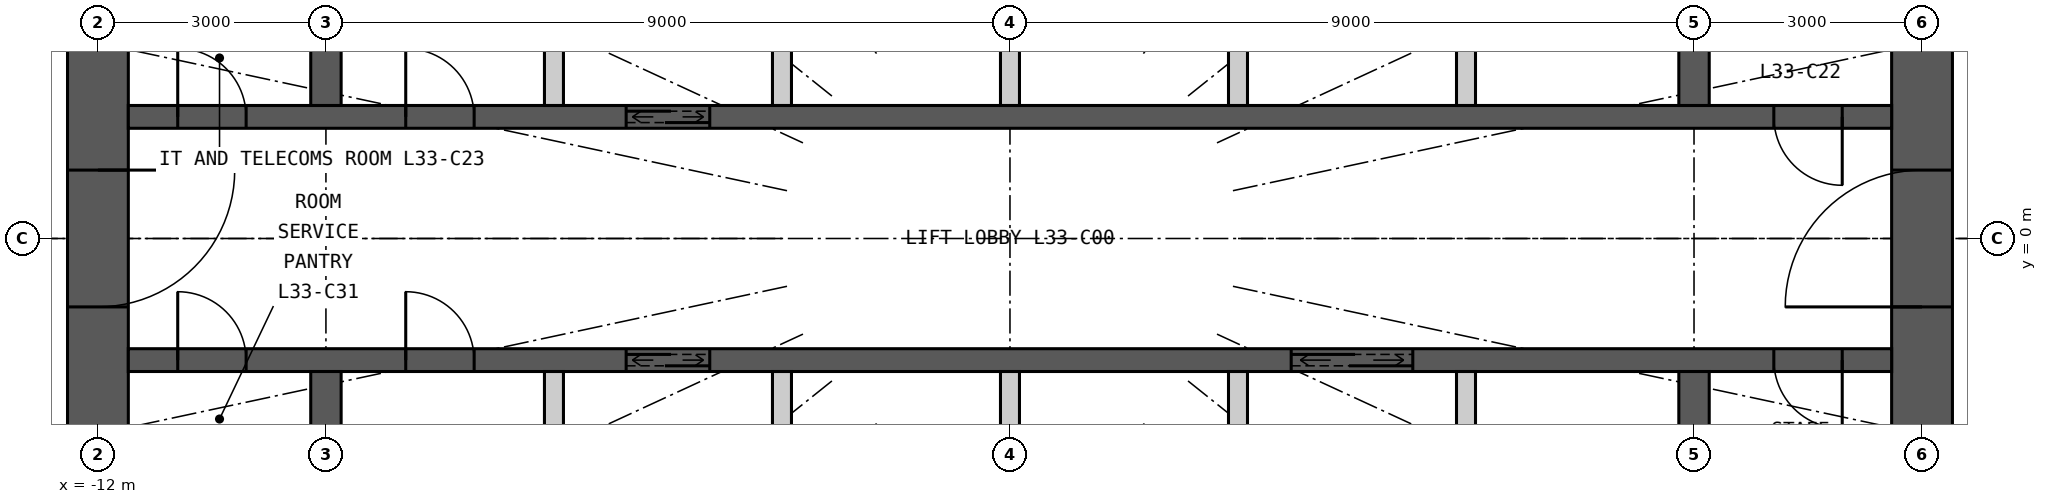
"""IFC4 building model, lengths in metres.
Left out: names, types, materials, properties, quantities, classifications, styles, units other than length and angle.
Written with IfcOpenShell. Run it as: python <this file> out.ifc"""

import sys

from ifc_helpers import new_model, si_unit, direction, frame, frame_2d, origin, place, context, subcontext, project, spatial, rectangle, extrude, element, fill, save


model = new_model("IFC4")
c1 = context("Model", 3, precision=1e-05, world=origin(), true_north=direction((0.0, 1.0)))
c2 = subcontext(c1, "Body", "Model", "MODEL_VIEW")
j1 = project(units=[si_unit("LENGTHUNIT", "METRE"), si_unit("PLANEANGLEUNIT", "RADIAN")], contexts=[c1])
p1 = place(None, origin())
s1 = spatial("IfcSite", under=j1, at=p1, CompositionType="ELEMENT")
p2 = place(p1, origin())
s2 = spatial("IfcBuilding", under=s1, at=p2, CompositionType="ELEMENT")
p3 = place(p2, frame((0.0, 0.0, 128.7)))
s3 = spatial("IfcBuildingStorey", under=s2, at=p3, CompositionType="ELEMENT", Elevation=128.7)
p4 = place(p3, frame((12.0, -7.6, 0.0), z_axis=(0.0, 0.0, 1.0), x_axis=(0.0, 1.0, 0.0)))
e1 = element("IfcWall", 1, at=p4, inside=s3, PredefinedType="SHEAR", context=c2, shape_type="SweptSolid", body=[
    extrude(rectangle(XDim=15.2, YDim=0.8, at=frame_2d((7.6, 0.0))), origin(), (0.0, 0.0, 1.0), 3.3),
])
p5 = place(p4, frame((6.7, 0.0, 0.0)))
e2 = element("IfcOpeningElement", 2, at=p5, cuts=e1, PredefinedType="OPENING", context=c2, shape_type="SweptSolid", body=[
    extrude(rectangle(XDim=1.8, YDim=2.2, at=frame_2d((0.9, 1.1))), frame((0.0, 0.41, 0.0), z_axis=(0.0, -1.0, 0.0), x_axis=(1.0, 0.0, 0.0)), (0.0, 0.0, 1.0), 0.82),
])
p6 = place(p3, frame((-12.0, 7.6, 0.0), z_axis=(0.0, 0.0, 1.0), x_axis=(0.0, -1.0, 0.0)))
e3 = element("IfcWall", 3, at=p6, inside=s3, PredefinedType="SHEAR", context=c2, shape_type="SweptSolid", body=[
    extrude(rectangle(XDim=15.2, YDim=0.8, at=frame_2d((7.6, 0.0))), origin(), (0.0, 0.0, 1.0), 3.3),
])
p7 = place(p6, frame((6.7, 0.0, 0.0)))
e4 = element("IfcOpeningElement", 4, at=p7, cuts=e3, PredefinedType="OPENING", context=c2, shape_type="SweptSolid", body=[
    extrude(rectangle(XDim=1.8, YDim=2.2, at=frame_2d((0.9, 1.1))), frame((0.0, 0.41, 0.0), z_axis=(0.0, -1.0, 0.0), x_axis=(1.0, 0.0, 0.0)), (0.0, 0.0, 1.0), 0.82),
])
p8 = place(p3, frame((-11.6, 1.6, 0.0), z_axis=(0.0, 0.0, 1.0), x_axis=(1.0, 0.0, 0.0)))
e5 = element("IfcWall", 5, at=p8, inside=s3, PredefinedType="SHEAR", context=c2, shape_type="SweptSolid", body=[
    extrude(rectangle(XDim=23.2, YDim=0.3, at=frame_2d((11.6, 0.0))), origin(), (0.0, 0.0, 1.0), 3.3),
])
p9 = place(p8, frame((6.55, 0.0, 0.0)))
e6 = element("IfcOpeningElement", 6, at=p9, cuts=e5, PredefinedType="OPENING", context=c2, shape_type="SweptSolid", body=[
    extrude(rectangle(XDim=1.1, YDim=2.2, at=frame_2d((0.55, 1.1))), frame((0.0, 0.16, 0.0), z_axis=(0.0, -1.0, 0.0), x_axis=(1.0, 0.0, 0.0)), (0.0, 0.0, 1.0), 0.32),
])
p10 = place(p8, frame((3.65, 0.0, 0.0)))
e7 = element("IfcOpeningElement", 7, at=p10, cuts=e5, PredefinedType="OPENING", context=c2, shape_type="SweptSolid", body=[
    extrude(rectangle(XDim=0.9, YDim=2.2, at=frame_2d((0.45, 1.1))), frame((0.0, 0.16, 0.0), z_axis=(0.0, -1.0, 0.0), x_axis=(1.0, 0.0, 0.0)), (0.0, 0.0, 1.0), 0.32),
])
p11 = place(p8, frame((21.65, 0.0, 0.0)))
e8 = element("IfcOpeningElement", 8, at=p11, cuts=e5, PredefinedType="OPENING", context=c2, shape_type="SweptSolid", body=[
    extrude(rectangle(XDim=0.9, YDim=2.2, at=frame_2d((0.45, 1.1))), frame((0.0, 0.16, 0.0), z_axis=(0.0, -1.0, 0.0), x_axis=(1.0, 0.0, 0.0)), (0.0, 0.0, 1.0), 0.32),
])
p12 = place(p8, frame((0.65, 0.0, 0.0)))
e9 = element("IfcOpeningElement", 9, at=p12, cuts=e5, PredefinedType="OPENING", context=c2, shape_type="SweptSolid", body=[
    extrude(rectangle(XDim=0.9, YDim=2.2, at=frame_2d((0.45, 1.1))), frame((0.0, 0.16, 0.0), z_axis=(0.0, -1.0, 0.0), x_axis=(1.0, 0.0, 0.0)), (0.0, 0.0, 1.0), 0.32),
])
p13 = place(p3, frame((-11.6, -1.6, 0.0), z_axis=(0.0, 0.0, 1.0), x_axis=(1.0, 0.0, 0.0)))
e10 = element("IfcWall", 10, at=p13, inside=s3, PredefinedType="SHEAR", context=c2, shape_type="SweptSolid", body=[
    extrude(rectangle(XDim=23.2, YDim=0.3, at=frame_2d((11.6, 0.0))), origin(), (0.0, 0.0, 1.0), 3.3),
])
p14 = place(p13, frame((6.55, 0.0, 0.0)))
e11 = element("IfcOpeningElement", 11, at=p14, cuts=e10, PredefinedType="OPENING", context=c2, shape_type="SweptSolid", body=[
    extrude(rectangle(XDim=1.1, YDim=2.2, at=frame_2d((0.55, 1.1))), frame((0.0, 0.16, 0.0), z_axis=(0.0, -1.0, 0.0), x_axis=(1.0, 0.0, 0.0)), (0.0, 0.0, 1.0), 0.32),
])
p15 = place(p13, frame((15.3, 0.0, 0.0)))
e12 = element("IfcOpeningElement", 12, at=p15, cuts=e10, PredefinedType="OPENING", context=c2, shape_type="SweptSolid", body=[
    extrude(rectangle(XDim=1.6, YDim=2.4, at=frame_2d((0.8, 1.2))), frame((0.0, 0.16, 0.0), z_axis=(0.0, -1.0, 0.0), x_axis=(1.0, 0.0, 0.0)), (0.0, 0.0, 1.0), 0.32),
])
p16 = place(p13, frame((0.65, 0.0, 0.0)))
e13 = element("IfcOpeningElement", 13, at=p16, cuts=e10, PredefinedType="OPENING", context=c2, shape_type="SweptSolid", body=[
    extrude(rectangle(XDim=0.9, YDim=2.2, at=frame_2d((0.45, 1.1))), frame((0.0, 0.16, 0.0), z_axis=(0.0, -1.0, 0.0), x_axis=(1.0, 0.0, 0.0)), (0.0, 0.0, 1.0), 0.32),
])
p17 = place(p13, frame((3.65, 0.0, 0.0)))
e14 = element("IfcOpeningElement", 14, at=p17, cuts=e10, PredefinedType="OPENING", context=c2, shape_type="SweptSolid", body=[
    extrude(rectangle(XDim=0.9, YDim=2.2, at=frame_2d((0.45, 1.1))), frame((0.0, 0.16, 0.0), z_axis=(0.0, -1.0, 0.0), x_axis=(1.0, 0.0, 0.0)), (0.0, 0.0, 1.0), 0.32),
])
p18 = place(p13, frame((21.65, 0.0, 0.0)))
e15 = element("IfcOpeningElement", 15, at=p18, cuts=e10, PredefinedType="OPENING", context=c2, shape_type="SweptSolid", body=[
    extrude(rectangle(XDim=0.9, YDim=2.2, at=frame_2d((0.45, 1.1))), frame((0.0, 0.16, 0.0), z_axis=(0.0, -1.0, 0.0), x_axis=(1.0, 0.0, 0.0)), (0.0, 0.0, 1.0), 0.32),
])
for number, where, z_axis, x_axis in (
    (16, (-9.0, 1.75, 0.0), (0.0, 0.0, 1.0), (0.0, 1.0, 0.0)),
    (17, (-9.0, -4.1, 0.0), (0.0, 0.0, 1.0), (0.0, 1.0, 0.0)),
    (18, (9.0, 1.75, 0.0), (0.0, 0.0, 1.0), (0.0, 1.0, 0.0)),
    (19, (9.0, -4.1, 0.0), (0.0, 0.0, 1.0), (0.0, 1.0, 0.0)),
):
    element("IfcWall", number, at=place(p3, frame(where, z_axis=z_axis, x_axis=x_axis)), inside=s3, PredefinedType="SHEAR", context=c2, shape_type="SweptSolid", body=[
        extrude(rectangle(XDim=2.35, YDim=0.4, at=frame_2d((1.175, 0.0))), origin(), (0.0, 0.0, 1.0), 3.3),
    ])
for number, where, z_axis, x_axis in (
    (20, (-6.0, 1.75, 0.0), (0.0, 0.0, 1.0), (0.0, 1.0, 0.0)),
    (21, (-3.0, 1.75, 0.0), (0.0, 0.0, 1.0), (0.0, 1.0, 0.0)),
    (22, (0.0, 1.75, 0.0), (0.0, 0.0, 1.0), (0.0, 1.0, 0.0)),
    (23, (3.0, 1.75, 0.0), (0.0, 0.0, 1.0), (0.0, 1.0, 0.0)),
    (24, (6.0, 1.75, 0.0), (0.0, 0.0, 1.0), (0.0, 1.0, 0.0)),
    (25, (-6.0, -4.1, 0.0), (0.0, 0.0, 1.0), (0.0, 1.0, 0.0)),
    (26, (-3.0, -4.1, 0.0), (0.0, 0.0, 1.0), (0.0, 1.0, 0.0)),
    (27, (0.0, -4.1, 0.0), (0.0, 0.0, 1.0), (0.0, 1.0, 0.0)),
    (28, (3.0, -4.1, 0.0), (0.0, 0.0, 1.0), (0.0, 1.0, 0.0)),
    (29, (6.0, -4.1, 0.0), (0.0, 0.0, 1.0), (0.0, 1.0, 0.0)),
):
    element("IfcWall", number, at=place(p3, frame(where, z_axis=z_axis, x_axis=x_axis)), inside=s3, PredefinedType="PARTITIONING", context=c2, shape_type="SweptSolid", body=[
        extrude(rectangle(XDim=2.35, YDim=0.25, at=frame_2d((1.175, 0.0))), origin(), (0.0, 0.0, 1.0), 3.3),
    ])
p19 = place(p9, origin())
e30 = element("IfcDoor", 30, at=p19, inside=s3, OperationType="DOUBLE_DOOR_SLIDING", PredefinedType="DOOR", context=c2, shape_type="SweptSolid", body=[
    extrude(rectangle(XDim=1.1, YDim=2.2, at=frame_2d((0.55, 1.1))), frame((0.0, 0.025, 0.0), z_axis=(0.0, -1.0, 0.0), x_axis=(1.0, 0.0, 0.0)), (0.0, 0.0, 1.0), 0.05),
])
fill(e6, e30)
p20 = place(p14, origin())
e31 = element("IfcDoor", 31, at=p20, inside=s3, OperationType="DOUBLE_DOOR_SLIDING", PredefinedType="DOOR", context=c2, shape_type="SweptSolid", body=[
    extrude(rectangle(XDim=1.1, YDim=2.2, at=frame_2d((0.55, 1.1))), frame((0.0, 0.025, 0.0), z_axis=(0.0, -1.0, 0.0), x_axis=(1.0, 0.0, 0.0)), (0.0, 0.0, 1.0), 0.05),
])
fill(e11, e31)
p21 = place(p15, origin())
e32 = element("IfcDoor", 32, at=p21, inside=s3, OperationType="DOUBLE_DOOR_SLIDING", PredefinedType="DOOR", context=c2, shape_type="SweptSolid", body=[
    extrude(rectangle(XDim=1.6, YDim=2.4, at=frame_2d((0.8, 1.2))), frame((0.0, 0.025, 0.0), z_axis=(0.0, -1.0, 0.0), x_axis=(1.0, 0.0, 0.0)), (0.0, 0.0, 1.0), 0.05),
])
fill(e12, e32)
p22 = place(p10, origin())
e33 = element("IfcDoor", 33, at=p22, inside=s3, OperationType="SINGLE_SWING_LEFT", PredefinedType="DOOR", context=c2, shape_type="SweptSolid", body=[
    extrude(rectangle(XDim=0.9, YDim=2.2, at=frame_2d((0.45, 1.1))), frame((0.0, 0.025, 0.0), z_axis=(0.0, -1.0, 0.0), x_axis=(1.0, 0.0, 0.0)), (0.0, 0.0, 1.0), 0.05),
])
fill(e7, e33)
p23 = place(p11, origin())
e34 = element("IfcDoor", 34, at=p23, inside=s3, OperationType="SINGLE_SWING_RIGHT", PredefinedType="DOOR", context=c2, shape_type="SweptSolid", body=[
    extrude(rectangle(XDim=0.9, YDim=2.2, at=frame_2d((0.45, 1.1))), frame((0.0, 0.025, 0.0), z_axis=(0.0, -1.0, 0.0), x_axis=(1.0, 0.0, 0.0)), (0.0, 0.0, 1.0), 0.05),
])
fill(e8, e34)
p24 = place(p16, origin())
e35 = element("IfcDoor", 35, at=p24, inside=s3, OperationType="SINGLE_SWING_LEFT", PredefinedType="DOOR", context=c2, shape_type="SweptSolid", body=[
    extrude(rectangle(XDim=0.9, YDim=2.2, at=frame_2d((0.45, 1.1))), frame((0.0, 0.025, 0.0), z_axis=(0.0, -1.0, 0.0), x_axis=(1.0, 0.0, 0.0)), (0.0, 0.0, 1.0), 0.05),
])
fill(e13, e35)
p25 = place(p17, origin())
e36 = element("IfcDoor", 36, at=p25, inside=s3, OperationType="SINGLE_SWING_LEFT", PredefinedType="DOOR", context=c2, shape_type="SweptSolid", body=[
    extrude(rectangle(XDim=0.9, YDim=2.2, at=frame_2d((0.45, 1.1))), frame((0.0, 0.025, 0.0), z_axis=(0.0, -1.0, 0.0), x_axis=(1.0, 0.0, 0.0)), (0.0, 0.0, 1.0), 0.05),
])
fill(e14, e36)
p26 = place(p18, origin())
e37 = element("IfcDoor", 37, at=p26, inside=s3, OperationType="SINGLE_SWING_RIGHT", PredefinedType="DOOR", context=c2, shape_type="SweptSolid", body=[
    extrude(rectangle(XDim=0.9, YDim=2.2, at=frame_2d((0.45, 1.1))), frame((0.0, 0.025, 0.0), z_axis=(0.0, -1.0, 0.0), x_axis=(1.0, 0.0, 0.0)), (0.0, 0.0, 1.0), 0.05),
])
fill(e15, e37)
p27 = place(p12, origin())
e38 = element("IfcDoor", 38, at=p27, inside=s3, OperationType="SINGLE_SWING_LEFT", PredefinedType="DOOR", context=c2, shape_type="SweptSolid", body=[
    extrude(rectangle(XDim=0.9, YDim=2.2, at=frame_2d((0.45, 1.1))), frame((0.0, 0.025, 0.0), z_axis=(0.0, -1.0, 0.0), x_axis=(1.0, 0.0, 0.0)), (0.0, 0.0, 1.0), 0.05),
])
fill(e9, e38)
p28 = place(p5, origin())
e39 = element("IfcDoor", 39, at=p28, inside=s3, OperationType="DOUBLE_DOOR_DOUBLE_SWING", PredefinedType="DOOR", context=c2, shape_type="SweptSolid", body=[
    extrude(rectangle(XDim=1.8, YDim=2.2, at=frame_2d((0.9, 1.1))), frame((0.0, 0.025, 0.0), z_axis=(0.0, -1.0, 0.0), x_axis=(1.0, 0.0, 0.0)), (0.0, 0.0, 1.0), 0.05),
])
fill(e2, e39)
p29 = place(p7, origin())
e40 = element("IfcDoor", 40, at=p29, inside=s3, OperationType="DOUBLE_DOOR_DOUBLE_SWING", PredefinedType="DOOR", context=c2, shape_type="SweptSolid", body=[
    extrude(rectangle(XDim=1.8, YDim=2.2, at=frame_2d((0.9, 1.1))), frame((0.0, 0.025, 0.0), z_axis=(0.0, -1.0, 0.0), x_axis=(1.0, 0.0, 0.0)), (0.0, 0.0, 1.0), 0.05),
])
fill(e4, e40)
save(model, sys.argv[1])
